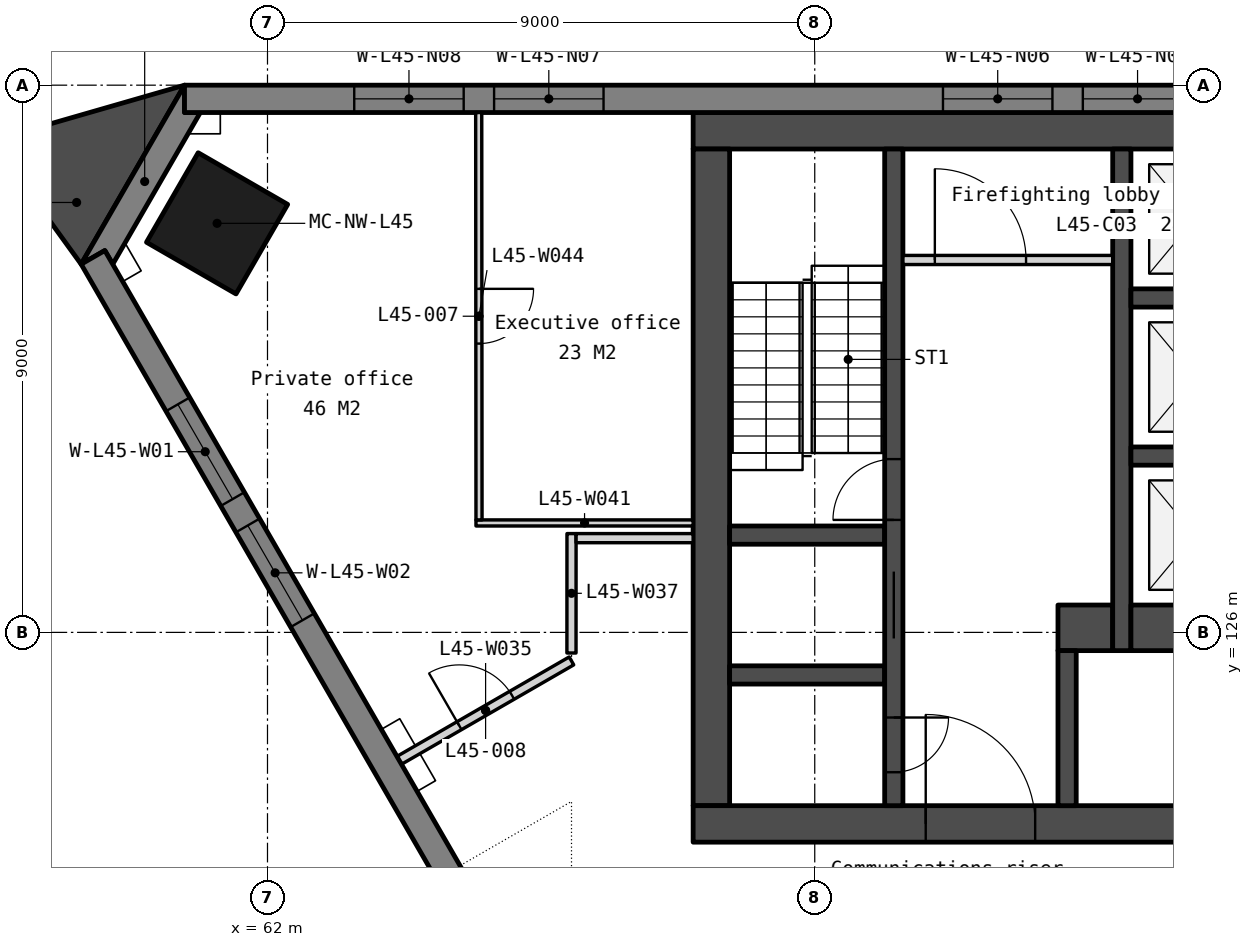
"""IFC4 building model, lengths in metres.
Left out: names, types, materials, properties, quantities, classifications, styles, units other than length and angle.
Written with IfcOpenShell. Run it as: python <this file> out.ifc"""

import sys

from ifc_helpers import new_model, si_unit, direction, frame, frame_2d, origin, origin_2d, place, context, subcontext, project, spatial, polyline, rectangle, outline, extrude, element, fill, save


model = new_model("IFC4")
c1 = context("Model", 3, precision=1e-05, world=origin(), true_north=direction((0.0, 1.0)))
c2 = subcontext(c1, "Body", "Model", "MODEL_VIEW")
j1 = project(units=[si_unit("LENGTHUNIT", "METRE"), si_unit("PLANEANGLEUNIT", "RADIAN")], contexts=[c1])
p1 = place(None, origin())
s1 = spatial("IfcSite", under=j1, at=p1, CompositionType="ELEMENT")
p2 = place(p1, origin())
s2 = spatial("IfcBuilding", under=s1, at=p2, CompositionType="ELEMENT")
p3 = place(p2, frame((0.0, 0.0, 180.2)))
s3 = spatial("IfcBuildingStorey", under=s2, at=p3, CompositionType="ELEMENT", Elevation=180.2)
p4 = place(p3, frame((61.171, 132.728, 0.0), z_axis=(0.0, 0.0, 1.0), x_axis=(-0.5, -0.866025403784, 0.0)))
e1 = element("IfcColumn", 1, at=p4, inside=s3, PredefinedType="COLUMN", context=c2, shape_type="SweptSolid", body=[
    extrude(rectangle(XDim=1.7, YDim=1.7, at=origin_2d()), origin(), (0.0, 0.0, 1.0), 3.9),
])
p5 = place(p3, frame((69.0, 134.25, 0.0), z_axis=(0.0, 0.0, 1.0), x_axis=(1.0, 0.0, 0.0)))
e2 = element("IfcWall", 2, at=p5, inside=s3, PredefinedType="SOLIDWALL", context=c2, shape_type="SweptSolid", body=[
    extrude(rectangle(XDim=22.0, YDim=0.6, at=frame_2d((11.0, 0.0))), origin(), (0.0, 0.0, 1.0), 3.75),
])
p6 = place(p3, frame((69.3, 133.95, 0.0), z_axis=(0.0, 0.0, 1.0), x_axis=(0.0, -1.0, 0.0)))
e3 = element("IfcWall", 3, at=p6, inside=s3, PredefinedType="SOLIDWALL", context=c2, shape_type="SweptSolid", body=[
    extrude(rectangle(XDim=10.8, YDim=0.6, at=frame_2d((5.4, 0.0))), origin(), (0.0, 0.0, 1.0), 3.75),
])
p7 = place(p3, frame((69.0, 122.85, 0.0), z_axis=(0.0, 0.0, 1.0), x_axis=(1.0, 0.0, 0.0)))
e4 = element("IfcWall", 4, at=p7, inside=s3, PredefinedType="SOLIDWALL", context=c2, shape_type="SweptSolid", body=[
    extrude(rectangle(XDim=22.0, YDim=0.6, at=frame_2d((11.0, 0.0))), origin(), (0.0, 0.0, 1.0), 3.75),
])
p8 = place(p7, frame((16.375, 0.0, 0.0)))
e5 = element("IfcOpeningElement", 5, at=p8, cuts=e4, PredefinedType="OPENING", context=c2, shape_type="SweptSolid", body=[
    extrude(rectangle(XDim=1.8, YDim=2.1, at=frame_2d((0.9, 1.05))), frame((0.0, 0.31, 0.0), z_axis=(0.0, -1.0, 0.0), x_axis=(1.0, 0.0, 0.0)), (0.0, 0.0, 1.0), 0.62),
])
p9 = place(p7, frame((3.825, 0.0, 0.0)))
e6 = element("IfcOpeningElement", 6, at=p9, cuts=e4, PredefinedType="OPENING", context=c2, shape_type="SweptSolid", body=[
    extrude(rectangle(XDim=1.8, YDim=2.1, at=frame_2d((0.9, 1.05))), frame((0.0, 0.31, 0.0), z_axis=(0.0, -1.0, 0.0), x_axis=(1.0, 0.0, 0.0)), (0.0, 0.0, 1.0), 0.62),
])
p10 = place(p7, frame((12.85, 0.0, 0.0)))
e7 = element("IfcOpeningElement", 7, at=p10, cuts=e4, PredefinedType="OPENING", context=c2, shape_type="SweptSolid", body=[
    extrude(rectangle(XDim=1.5, YDim=2.1, at=frame_2d((0.75, 1.05))), frame((0.0, 0.31, 0.0), z_axis=(0.0, -1.0, 0.0), x_axis=(1.0, 0.0, 0.0)), (0.0, 0.0, 1.0), 0.62),
])
for number, where, z_axis, x_axis in (
    (8, (69.6, 127.6, 0.0), (0.0, 0.0, 1.0), (1.0, 0.0, 0.0)),
    (9, (69.6, 125.3, 0.0), (0.0, 0.0, 1.0), (1.0, 0.0, 0.0)),
):
    element("IfcWall", number, at=place(p3, frame(where, z_axis=z_axis, x_axis=x_axis)), inside=s3, PredefinedType="SOLIDWALL", context=c2, shape_type="SweptSolid", body=[
        extrude(rectangle(XDim=2.55, YDim=0.3, at=frame_2d((1.275, 0.0))), origin(), (0.0, 0.0, 1.0), 3.75),
    ])
p11 = place(p3, frame((72.3, 133.95, 0.0), z_axis=(0.0, 0.0, 1.0), x_axis=(0.0, -1.0, 0.0)))
e10 = element("IfcWall", 10, at=p11, inside=s3, PredefinedType="SOLIDWALL", context=c2, shape_type="SweptSolid", body=[
    extrude(rectangle(XDim=10.8, YDim=0.3, at=frame_2d((5.4, 0.0))), origin(), (0.0, 0.0, 1.0), 3.75),
])
p12 = place(p11, frame((6.95, 0.0, 0.0)))
e11 = element("IfcOpeningElement", 11, at=p12, cuts=e10, PredefinedType="OPENING", context=c2, shape_type="SweptSolid", body=[
    extrude(rectangle(XDim=1.1, YDim=2.1, at=frame_2d((0.55, 1.05))), frame((0.0, 0.16, 0.0), z_axis=(0.0, -1.0, 0.0), x_axis=(1.0, 0.0, 0.0)), (0.0, 0.0, 1.0), 0.32),
])
p13 = place(p11, frame((9.35, 0.0, 0.0)))
e12 = element("IfcOpeningElement", 12, at=p13, cuts=e10, PredefinedType="OPENING", context=c2, shape_type="SweptSolid", body=[
    extrude(rectangle(XDim=0.9, YDim=2.1, at=frame_2d((0.45, 1.05))), frame((0.0, 0.16, 0.0), z_axis=(0.0, -1.0, 0.0), x_axis=(1.0, 0.0, 0.0)), (0.0, 0.0, 1.0), 0.32),
])
p14 = place(p11, frame((5.1, 0.0, 0.0)))
e13 = element("IfcOpeningElement", 13, at=p14, cuts=e10, PredefinedType="OPENING", context=c2, shape_type="SweptSolid", body=[
    extrude(rectangle(XDim=1.0, YDim=2.1, at=frame_2d((0.5, 1.05))), frame((0.0, 0.16, 0.0), z_axis=(0.0, -1.0, 0.0), x_axis=(1.0, 0.0, 0.0)), (0.0, 0.0, 1.0), 0.32),
])
p15 = place(p3, frame((72.45, 132.125, 0.0), z_axis=(0.0, 0.0, 1.0), x_axis=(1.0, 0.0, 0.0)))
e14 = element("IfcWall", 14, at=p15, inside=s3, PredefinedType="PARTITIONING", context=c2, shape_type="SweptSolid", body=[
    extrude(rectangle(XDim=3.45, YDim=0.15, at=frame_2d((1.725, 0.0))), origin(), (0.0, 0.0, 1.0), 3.75),
])
p16 = place(p15, frame((0.525, 0.0, 0.0)))
e15 = element("IfcOpeningElement", 15, at=p16, cuts=e14, PredefinedType="OPENING", context=c2, shape_type="SweptSolid", body=[
    extrude(rectangle(XDim=1.5, YDim=2.1, at=frame_2d((0.75, 1.05))), frame((0.0, 0.085, 0.0), z_axis=(0.0, -1.0, 0.0), x_axis=(1.0, 0.0, 0.0)), (0.0, 0.0, 1.0), 0.17),
])
p17 = place(p3, frame((75.0, 126.075, 0.0), z_axis=(0.0, 0.0, 1.0), x_axis=(1.0, 0.0, 0.0)))
e16 = element("IfcWall", 16, at=p17, inside=s3, PredefinedType="SOLIDWALL", context=c2, shape_type="SweptSolid", body=[
    extrude(rectangle(XDim=0.9, YDim=0.75, at=frame_2d((0.45, 0.0))), origin(), (0.0, 0.0, 1.0), 3.75),
])
p18 = place(p3, frame((75.15, 125.7, 0.0), z_axis=(0.0, 0.0, 1.0), x_axis=(0.0, -1.0, 0.0)))
e17 = element("IfcWall", 17, at=p18, inside=s3, PredefinedType="SOLIDWALL", context=c2, shape_type="SweptSolid", body=[
    extrude(rectangle(XDim=2.55, YDim=0.3, at=frame_2d((1.275, 0.0))), origin(), (0.0, 0.0, 1.0), 3.75),
])
p19 = place(p3, frame((76.05, 133.95, 0.0), z_axis=(0.0, 0.0, 1.0), x_axis=(0.0, -1.0, 0.0)))
e18 = element("IfcWall", 18, at=p19, inside=s3, PredefinedType="SOLIDWALL", context=c2, shape_type="SweptSolid", body=[
    extrude(rectangle(XDim=8.25, YDim=0.3, at=frame_2d((4.125, 0.0))), origin(), (0.0, 0.0, 1.0), 3.75),
])
for number, where, z_axis, x_axis in (
    (19, (76.2, 131.5, 0.0), (0.0, 0.0, 1.0), (1.0, 0.0, 0.0)),
    (20, (76.2, 128.9, 0.0), (0.0, 0.0, 1.0), (1.0, 0.0, 0.0)),
):
    element("IfcWall", number, at=place(p3, frame(where, z_axis=z_axis, x_axis=x_axis)), inside=s3, PredefinedType="SOLIDWALL", context=c2, shape_type="SweptSolid", body=[
        extrude(rectangle(XDim=2.1, YDim=0.3, at=frame_2d((1.05, 0.0))), origin(), (0.0, 0.0, 1.0), 3.75),
    ])
p20 = place(p3, frame((76.2, 126.075, 0.0), z_axis=(0.0, 0.0, 1.0), x_axis=(1.0, 0.0, 0.0)))
e21 = element("IfcWall", 21, at=p20, inside=s3, PredefinedType="SOLIDWALL", context=c2, shape_type="SweptSolid", body=[
    extrude(rectangle(XDim=2.1, YDim=0.75, at=frame_2d((1.05, 0.0))), origin(), (0.0, 0.0, 1.0), 3.75),
])
p21 = place(p3, frame((0.0, 0.0, -0.45)))
e22 = element("IfcWall", 22, at=p21, inside=s3, PredefinedType="SOLIDWALL", context=c2, shape_type="SweptSolid", body=[
    extrude(outline(polyline([(60.635, 135.0), (60.635, 134.55), (60.895, 134.55), (59.455, 132.055), (59.325, 132.281), (58.935, 132.055), (60.635, 135.0)])), origin(), (0.0, 0.0, 1.0), 4.2),
])
p22 = place(p3, frame((99.365, 134.775, -0.45), z_axis=(0.0, 0.0, 1.0), x_axis=(-1.0, 0.0, 0.0)))
e23 = element("IfcWall", 23, at=p22, inside=s3, PredefinedType="SOLIDWALL", context=c2, shape_type="SweptSolid", body=[
    extrude(outline(polyline([(38.729, 0.0), (38.729, 4.2), (0.0, 4.2), (0.0, 0.0), (38.729, 0.0)])), frame((0.0, 0.225, 0.0), z_axis=(0.0, -1.0, 0.0), x_axis=(1.0, 0.0, 0.0)), (0.0, 0.0, 1.0), 0.45),
])
p23 = place(p22, frame((2.791, 0.0, 1.25)))
e24 = element("IfcOpeningElement", 24, at=p23, cuts=e23, PredefinedType="OPENING", context=c2, shape_type="SweptSolid", body=[
    extrude(rectangle(XDim=1.8, YDim=2.2, at=frame_2d((0.9, 1.1))), frame((0.0, 0.235, 0.0), z_axis=(0.0, -1.0, 0.0), x_axis=(1.0, 0.0, 0.0)), (0.0, 0.0, 1.0), 0.47),
])
p24 = place(p22, frame((5.091, 0.0, 1.25)))
e25 = element("IfcOpeningElement", 25, at=p24, cuts=e23, PredefinedType="OPENING", context=c2, shape_type="SweptSolid", body=[
    extrude(rectangle(XDim=1.8, YDim=2.2, at=frame_2d((0.9, 1.1))), frame((0.0, 0.235, 0.0), z_axis=(0.0, -1.0, 0.0), x_axis=(1.0, 0.0, 0.0)), (0.0, 0.0, 1.0), 0.47),
])
p25 = place(p22, frame((12.473, 0.0, 1.25)))
e26 = element("IfcOpeningElement", 26, at=p25, cuts=e23, PredefinedType="OPENING", context=c2, shape_type="SweptSolid", body=[
    extrude(rectangle(XDim=1.8, YDim=2.2, at=frame_2d((0.9, 1.1))), frame((0.0, 0.235, 0.0), z_axis=(0.0, -1.0, 0.0), x_axis=(1.0, 0.0, 0.0)), (0.0, 0.0, 1.0), 0.47),
])
p26 = place(p22, frame((14.773, 0.0, 1.25)))
e27 = element("IfcOpeningElement", 27, at=p26, cuts=e23, PredefinedType="OPENING", context=c2, shape_type="SweptSolid", body=[
    extrude(rectangle(XDim=1.8, YDim=2.2, at=frame_2d((0.9, 1.1))), frame((0.0, 0.235, 0.0), z_axis=(0.0, -1.0, 0.0), x_axis=(1.0, 0.0, 0.0)), (0.0, 0.0, 1.0), 0.47),
])
p27 = place(p22, frame((22.156, 0.0, 1.25)))
e28 = element("IfcOpeningElement", 28, at=p27, cuts=e23, PredefinedType="OPENING", context=c2, shape_type="SweptSolid", body=[
    extrude(rectangle(XDim=1.8, YDim=2.2, at=frame_2d((0.9, 1.1))), frame((0.0, 0.235, 0.0), z_axis=(0.0, -1.0, 0.0), x_axis=(1.0, 0.0, 0.0)), (0.0, 0.0, 1.0), 0.47),
])
p28 = place(p22, frame((24.456, 0.0, 1.25)))
e29 = element("IfcOpeningElement", 29, at=p28, cuts=e23, PredefinedType="OPENING", context=c2, shape_type="SweptSolid", body=[
    extrude(rectangle(XDim=1.8, YDim=2.2, at=frame_2d((0.9, 1.1))), frame((0.0, 0.235, 0.0), z_axis=(0.0, -1.0, 0.0), x_axis=(1.0, 0.0, 0.0)), (0.0, 0.0, 1.0), 0.47),
])
p29 = place(p22, frame((31.838, 0.0, 1.25)))
e30 = element("IfcOpeningElement", 30, at=p29, cuts=e23, PredefinedType="OPENING", context=c2, shape_type="SweptSolid", body=[
    extrude(rectangle(XDim=1.8, YDim=2.2, at=frame_2d((0.9, 1.1))), frame((0.0, 0.235, 0.0), z_axis=(0.0, -1.0, 0.0), x_axis=(1.0, 0.0, 0.0)), (0.0, 0.0, 1.0), 0.47),
])
p30 = place(p22, frame((34.138, 0.0, 1.25)))
e31 = element("IfcOpeningElement", 31, at=p30, cuts=e23, PredefinedType="OPENING", context=c2, shape_type="SweptSolid", body=[
    extrude(rectangle(XDim=1.8, YDim=2.2, at=frame_2d((0.9, 1.1))), frame((0.0, 0.235, 0.0), z_axis=(0.0, -1.0, 0.0), x_axis=(1.0, 0.0, 0.0)), (0.0, 0.0, 1.0), 0.47),
])
p31 = place(p3, frame((59.13, 132.168, -0.45), z_axis=(0.0, 0.0, 1.0), x_axis=(0.500002199942, -0.866024133644, 0.0)))
e32 = element("IfcWall", 32, at=p31, inside=s3, PredefinedType="SOLIDWALL", context=c2, shape_type="SweptSolid", body=[
    extrude(outline(polyline([(38.729, 0.0), (38.729, 4.2), (0.0, 4.2), (0.0, 0.0), (38.729, 0.0)])), frame((0.0, 0.225, 0.0), z_axis=(0.0, -1.0, 0.0), x_axis=(1.0, 0.0, 0.0)), (0.0, 0.0, 1.0), 0.45),
])
p32 = place(p31, frame((2.791, 0.0, 1.25)))
e33 = element("IfcOpeningElement", 33, at=p32, cuts=e32, PredefinedType="OPENING", context=c2, shape_type="SweptSolid", body=[
    extrude(rectangle(XDim=1.8, YDim=2.2, at=frame_2d((0.9, 1.1))), frame((0.0, 0.235, 0.0), z_axis=(0.0, -1.0, 0.0), x_axis=(1.0, 0.0, 0.0)), (0.0, 0.0, 1.0), 0.47),
])
p33 = place(p31, frame((5.091, 0.0, 1.25)))
e34 = element("IfcOpeningElement", 34, at=p33, cuts=e32, PredefinedType="OPENING", context=c2, shape_type="SweptSolid", body=[
    extrude(rectangle(XDim=1.8, YDim=2.2, at=frame_2d((0.9, 1.1))), frame((0.0, 0.235, 0.0), z_axis=(0.0, -1.0, 0.0), x_axis=(1.0, 0.0, 0.0)), (0.0, 0.0, 1.0), 0.47),
])
p34 = place(p31, frame((12.473, 0.0, 1.25)))
e35 = element("IfcOpeningElement", 35, at=p34, cuts=e32, PredefinedType="OPENING", context=c2, shape_type="SweptSolid", body=[
    extrude(rectangle(XDim=1.8, YDim=2.2, at=frame_2d((0.9, 1.1))), frame((0.0, 0.235, 0.0), z_axis=(0.0, -1.0, 0.0), x_axis=(1.0, 0.0, 0.0)), (0.0, 0.0, 1.0), 0.47),
])
p35 = place(p31, frame((14.773, 0.0, 1.25)))
e36 = element("IfcOpeningElement", 36, at=p35, cuts=e32, PredefinedType="OPENING", context=c2, shape_type="SweptSolid", body=[
    extrude(rectangle(XDim=1.8, YDim=2.2, at=frame_2d((0.9, 1.1))), frame((0.0, 0.235, 0.0), z_axis=(0.0, -1.0, 0.0), x_axis=(1.0, 0.0, 0.0)), (0.0, 0.0, 1.0), 0.47),
])
p36 = place(p31, frame((22.156, 0.0, 1.25)))
e37 = element("IfcOpeningElement", 37, at=p36, cuts=e32, PredefinedType="OPENING", context=c2, shape_type="SweptSolid", body=[
    extrude(rectangle(XDim=1.8, YDim=2.2, at=frame_2d((0.9, 1.1))), frame((0.0, 0.235, 0.0), z_axis=(0.0, -1.0, 0.0), x_axis=(1.0, 0.0, 0.0)), (0.0, 0.0, 1.0), 0.47),
])
p37 = place(p31, frame((24.456, 0.0, 1.25)))
e38 = element("IfcOpeningElement", 38, at=p37, cuts=e32, PredefinedType="OPENING", context=c2, shape_type="SweptSolid", body=[
    extrude(rectangle(XDim=1.8, YDim=2.2, at=frame_2d((0.9, 1.1))), frame((0.0, 0.235, 0.0), z_axis=(0.0, -1.0, 0.0), x_axis=(1.0, 0.0, 0.0)), (0.0, 0.0, 1.0), 0.47),
])
p38 = place(p31, frame((31.838, 0.0, 1.25)))
e39 = element("IfcOpeningElement", 39, at=p38, cuts=e32, PredefinedType="OPENING", context=c2, shape_type="SweptSolid", body=[
    extrude(rectangle(XDim=1.8, YDim=2.2, at=frame_2d((0.9, 1.1))), frame((0.0, 0.235, 0.0), z_axis=(0.0, -1.0, 0.0), x_axis=(1.0, 0.0, 0.0)), (0.0, 0.0, 1.0), 0.47),
])
p39 = place(p31, frame((34.138, 0.0, 1.25)))
e40 = element("IfcOpeningElement", 40, at=p39, cuts=e32, PredefinedType="OPENING", context=c2, shape_type="SweptSolid", body=[
    extrude(rectangle(XDim=1.8, YDim=2.2, at=frame_2d((0.9, 1.1))), frame((0.0, 0.235, 0.0), z_axis=(0.0, -1.0, 0.0), x_axis=(1.0, 0.0, 0.0)), (0.0, 0.0, 1.0), 0.47),
])
p40 = place(p3, frame((0.0, 0.0, -0.45)))
e41 = element("IfcWall", 41, at=p40, inside=s3, PredefinedType="SOLIDWALL", context=c2, shape_type="SweptSolid", body=[
    extrude(outline(polyline([(60.635, 135.0), (57.466, 134.086), (58.935, 132.055), (60.635, 135.0)])), origin(), (0.0, 0.0, 1.0), 4.2),
])
p41 = place(p3, frame((64.175, 123.9, 0.0), z_axis=(0.0, 0.0, 1.0), x_axis=(0.866032230194, 0.499988176125, 0.0)))
e42 = element("IfcWall", 42, at=p41, inside=s3, PredefinedType="PARTITIONING", context=c2, shape_type="SweptSolid", body=[
    extrude(rectangle(XDim=3.261, YDim=0.15, at=frame_2d((1.63, 0.0))), origin(), (0.0, 0.0, 1.0), 3.75),
])
p42 = place(p41, frame((1.13, 0.0, 0.0)))
e43 = element("IfcOpeningElement", 43, at=p42, cuts=e42, PredefinedType="OPENING", context=c2, shape_type="SweptSolid", body=[
    extrude(rectangle(XDim=1.0, YDim=2.1, at=frame_2d((0.5, 1.05))), frame((0.0, 0.085, 0.0), z_axis=(0.0, -1.0, 0.0), x_axis=(1.0, 0.0, 0.0)), (0.0, 0.0, 1.0), 0.17),
])
p43 = place(p3, frame((66.999, 125.661, 0.0), z_axis=(0.0, 0.0, 1.0), x_axis=(0.00049720317, 0.999999876394, 0.0)))
e44 = element("IfcWall", 44, at=p43, inside=s3, PredefinedType="PARTITIONING", context=c2, shape_type="SweptSolid", body=[
    extrude(rectangle(XDim=1.964, YDim=0.15, at=frame_2d((0.982, 0.0))), origin(), (0.0, 0.0, 1.0), 3.75),
])
p44 = place(p3, frame((67.075, 127.55, 0.0), z_axis=(0.0, 0.0, 1.0), x_axis=(1.0, 0.0, 0.0)))
e45 = element("IfcWall", 45, at=p44, inside=s3, PredefinedType="PARTITIONING", context=c2, shape_type="SweptSolid", body=[
    extrude(rectangle(XDim=1.925, YDim=0.15, at=frame_2d((0.962, 0.0))), origin(), (0.0, 0.0, 1.0), 3.75),
])
p45 = place(p3, frame((65.428, 127.8, 0.0), z_axis=(0.0, 0.0, 1.0), x_axis=(1.0, 0.0, 0.0)))
e46 = element("IfcWall", 46, at=p45, inside=s3, PredefinedType="PARTITIONING", context=c2, shape_type="SweptSolid", body=[
    extrude(rectangle(XDim=3.572, YDim=0.1, at=frame_2d((1.786, 0.0))), origin(), (0.0, 0.0, 1.0), 3.28),
])
p46 = place(p3, frame((65.474, 134.55, 0.0), z_axis=(0.0, 0.0, 1.0), x_axis=(0.000728783103, -0.999999734438, 0.0)))
e47 = element("IfcWall", 47, at=p46, inside=s3, PredefinedType="PARTITIONING", context=c2, shape_type="SweptSolid", body=[
    extrude(rectangle(XDim=6.7, YDim=0.1, at=frame_2d((3.35, 0.0))), origin(), (0.0, 0.0, 1.0), 3.75),
])
p47 = place(p46, frame((2.9, 0.0, 0.0)))
e48 = element("IfcOpeningElement", 48, at=p47, cuts=e47, PredefinedType="OPENING", context=c2, shape_type="SweptSolid", body=[
    extrude(rectangle(XDim=0.9, YDim=2.1, at=frame_2d((0.45, 1.05))), frame((0.0, 0.06, 0.0), z_axis=(0.0, -1.0, 0.0), x_axis=(1.0, 0.0, 0.0)), (0.0, 0.0, 1.0), 0.12),
])
p48 = place(p12, origin())
e49 = element("IfcDoor", 49, at=p48, inside=s3, OperationType="SLIDING_TO_LEFT", PredefinedType="DOOR", context=c2, shape_type="SweptSolid", body=[
    extrude(rectangle(XDim=1.1, YDim=2.1, at=frame_2d((0.55, 1.05))), frame((0.0, 0.025, 0.0), z_axis=(0.0, -1.0, 0.0), x_axis=(1.0, 0.0, 0.0)), (0.0, 0.0, 1.0), 0.05),
])
fill(e11, e49)
p49 = place(p9, origin())
e50 = element("IfcDoor", 50, at=p49, inside=s3, OperationType="DOUBLE_DOOR_DOUBLE_SWING", PredefinedType="DOOR", context=c2, shape_type="SweptSolid", body=[
    extrude(rectangle(XDim=1.8, YDim=2.1, at=frame_2d((0.9, 1.05))), frame((0.0, 0.025, 0.0), z_axis=(0.0, -1.0, 0.0), x_axis=(1.0, 0.0, 0.0)), (0.0, 0.0, 1.0), 0.05),
])
fill(e6, e50)
p50 = place(p16, origin())
e51 = element("IfcDoor", 51, at=p50, inside=s3, OperationType="DOUBLE_DOOR_DOUBLE_SWING", PredefinedType="DOOR", context=c2, shape_type="SweptSolid", body=[
    extrude(rectangle(XDim=1.5, YDim=2.1, at=frame_2d((0.75, 1.05))), frame((0.0, 0.025, 0.0), z_axis=(0.0, -1.0, 0.0), x_axis=(1.0, 0.0, 0.0)), (0.0, 0.0, 1.0), 0.05),
])
fill(e15, e51)
p51 = place(p13, origin())
e52 = element("IfcDoor", 52, at=p51, inside=s3, OperationType="SINGLE_SWING_LEFT", PredefinedType="DOOR", context=c2, shape_type="SweptSolid", body=[
    extrude(rectangle(XDim=0.9, YDim=2.1, at=frame_2d((0.45, 1.05))), frame((0.0, 0.025, 0.0), z_axis=(0.0, -1.0, 0.0), x_axis=(1.0, 0.0, 0.0)), (0.0, 0.0, 1.0), 0.05),
])
fill(e12, e52)
p52 = place(p14, origin())
e53 = element("IfcDoor", 53, at=p52, inside=s3, OperationType="SINGLE_SWING_RIGHT", PredefinedType="DOOR", context=c2, shape_type="SweptSolid", body=[
    extrude(rectangle(XDim=1.0, YDim=2.1, at=frame_2d((0.5, 1.05))), frame((0.0, 0.025, 0.0), z_axis=(0.0, -1.0, 0.0), x_axis=(1.0, 0.0, 0.0)), (0.0, 0.0, 1.0), 0.05),
])
fill(e13, e53)
p53 = place(p27, origin())
e54 = element("IfcWindow", 54, at=p53, inside=s3, PartitioningType="SINGLE_PANEL", PredefinedType="WINDOW", context=c2, shape_type="SweptSolid", body=[
    extrude(rectangle(XDim=1.8, YDim=2.2, at=frame_2d((0.9, 1.1))), frame((0.0, 0.03, 0.0), z_axis=(0.0, -1.0, 0.0), x_axis=(1.0, 0.0, 0.0)), (0.0, 0.0, 1.0), 0.06),
])
fill(e28, e54)
p54 = place(p28, origin())
e55 = element("IfcWindow", 55, at=p54, inside=s3, PartitioningType="SINGLE_PANEL", PredefinedType="WINDOW", context=c2, shape_type="SweptSolid", body=[
    extrude(rectangle(XDim=1.8, YDim=2.2, at=frame_2d((0.9, 1.1))), frame((0.0, 0.03, 0.0), z_axis=(0.0, -1.0, 0.0), x_axis=(1.0, 0.0, 0.0)), (0.0, 0.0, 1.0), 0.06),
])
fill(e29, e55)
p55 = place(p29, origin())
e56 = element("IfcWindow", 56, at=p55, inside=s3, PartitioningType="SINGLE_PANEL", PredefinedType="WINDOW", context=c2, shape_type="SweptSolid", body=[
    extrude(rectangle(XDim=1.8, YDim=2.2, at=frame_2d((0.9, 1.1))), frame((0.0, 0.03, 0.0), z_axis=(0.0, -1.0, 0.0), x_axis=(1.0, 0.0, 0.0)), (0.0, 0.0, 1.0), 0.06),
])
fill(e30, e56)
p56 = place(p30, origin())
e57 = element("IfcWindow", 57, at=p56, inside=s3, PartitioningType="SINGLE_PANEL", PredefinedType="WINDOW", context=c2, shape_type="SweptSolid", body=[
    extrude(rectangle(XDim=1.8, YDim=2.2, at=frame_2d((0.9, 1.1))), frame((0.0, 0.03, 0.0), z_axis=(0.0, -1.0, 0.0), x_axis=(1.0, 0.0, 0.0)), (0.0, 0.0, 1.0), 0.06),
])
fill(e31, e57)
p57 = place(p32, origin())
e58 = element("IfcWindow", 58, at=p57, inside=s3, PartitioningType="SINGLE_PANEL", PredefinedType="WINDOW", context=c2, shape_type="SweptSolid", body=[
    extrude(rectangle(XDim=1.8, YDim=2.2, at=frame_2d((0.9, 1.1))), frame((0.0, 0.03, 0.0), z_axis=(0.0, -1.0, 0.0), x_axis=(1.0, 0.0, 0.0)), (0.0, 0.0, 1.0), 0.06),
])
fill(e33, e58)
p58 = place(p33, origin())
e59 = element("IfcWindow", 59, at=p58, inside=s3, PartitioningType="SINGLE_PANEL", PredefinedType="WINDOW", context=c2, shape_type="SweptSolid", body=[
    extrude(rectangle(XDim=1.8, YDim=2.2, at=frame_2d((0.9, 1.1))), frame((0.0, 0.03, 0.0), z_axis=(0.0, -1.0, 0.0), x_axis=(1.0, 0.0, 0.0)), (0.0, 0.0, 1.0), 0.06),
])
fill(e34, e59)
p59 = place(p47, origin())
e60 = element("IfcDoor", 60, at=p59, inside=s3, OperationType="SINGLE_SWING_LEFT", PredefinedType="DOOR", context=c2, shape_type="SweptSolid", body=[
    extrude(rectangle(XDim=0.9, YDim=2.1, at=frame_2d((0.45, 1.05))), frame((0.0, 0.025, 0.0), z_axis=(0.0, -1.0, 0.0), x_axis=(1.0, 0.0, 0.0)), (0.0, 0.0, 1.0), 0.05),
])
fill(e48, e60)
p60 = place(p42, origin())
e61 = element("IfcDoor", 61, at=p60, inside=s3, OperationType="SINGLE_SWING_LEFT", PredefinedType="DOOR", context=c2, shape_type="SweptSolid", body=[
    extrude(rectangle(XDim=1.0, YDim=2.1, at=frame_2d((0.5, 1.05))), frame((0.0, 0.025, 0.0), z_axis=(0.0, -1.0, 0.0), x_axis=(1.0, 0.0, 0.0)), (0.0, 0.0, 1.0), 0.05),
])
fill(e43, e61)
save(model, sys.argv[1])
